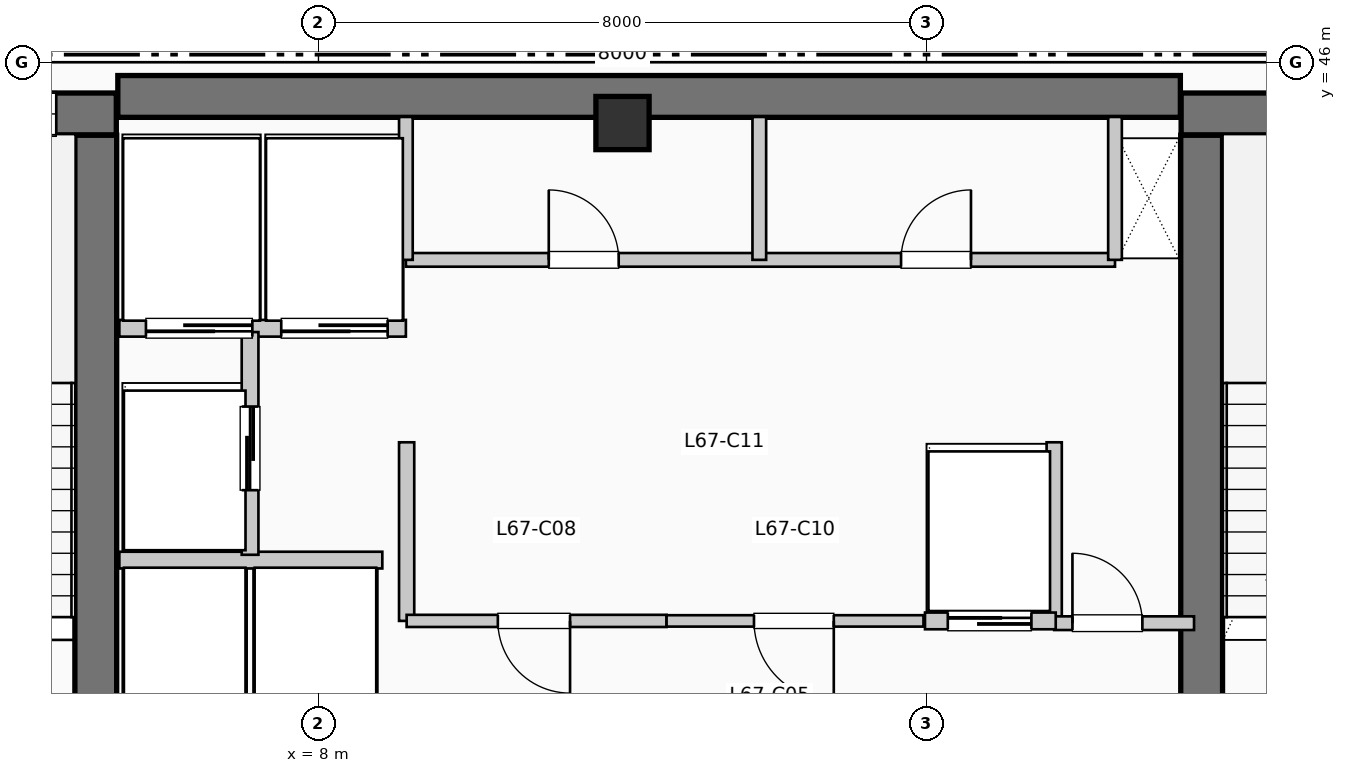
"""IFC4 building model, lengths in metres.
Left out: names, types, materials, properties, quantities, classifications, styles, units other than length and angle.
Written with IfcOpenShell. Run it as: python <this file> out.ifc"""

import sys

from ifc_helpers import new_model, si_unit, direction, frame, frame_2d, origin, origin_2d, place, context, subcontext, project, spatial, rectangle, extrude, element, fill, save


model = new_model("IFC4")
c1 = context("Model", 3, precision=1e-05, world=origin(), true_north=direction((0.0, 1.0)))
c2 = subcontext(c1, "Body", "Model", "MODEL_VIEW")
j1 = project(units=[si_unit("LENGTHUNIT", "METRE"), si_unit("PLANEANGLEUNIT", "RADIAN")], contexts=[c1])
p1 = place(None, origin())
s1 = spatial("IfcSite", under=j1, at=p1, CompositionType="ELEMENT")
p2 = place(p1, origin())
s2 = spatial("IfcBuilding", under=s1, at=p2, CompositionType="ELEMENT")
p3 = place(p2, frame((0.0, 0.0, 276.21)))
s3 = spatial("IfcBuildingStorey", under=s2, at=p3, CompositionType="ELEMENT", Elevation=276.21)
p4 = place(p3, frame((5.36, 45.55, 0.0), z_axis=(0.0, 0.0, 1.0), x_axis=(1.0, 0.0, 0.0)))
e1 = element("IfcWall", 1, at=p4, inside=s3, PredefinedType="SHEAR", context=c2, shape_type="SweptSolid", body=[
    extrude(rectangle(XDim=13.98, YDim=0.55, at=frame_2d((6.99, 0.0))), origin(), (0.0, 0.0, 1.0), 3.96),
])
p5 = place(p3, frame((5.07, 37.15, 0.0), z_axis=(0.0, 0.0, 1.0), x_axis=(0.0, 1.0, 0.0)))
e2 = element("IfcWall", 2, at=p5, inside=s3, PredefinedType="SHEAR", context=c2, shape_type="SweptSolid", body=[
    extrude(rectangle(XDim=7.89, YDim=0.55, at=frame_2d((3.945, 0.0))), origin(), (0.0, 0.0, 1.0), 3.96),
])
p6 = place(p3, frame((1.1, 45.32, 0.0), z_axis=(0.0, 0.0, 1.0), x_axis=(1.0, 0.0, 0.0)))
e3 = element("IfcWall", 3, at=p6, inside=s3, PredefinedType="SHEAR", context=c2, shape_type="SweptSolid", body=[
    extrude(rectangle(XDim=4.24, YDim=0.55, at=frame_2d((2.12, 0.0))), origin(), (0.0, 0.0, 1.0), 3.96),
])
p7 = place(p6, frame((2.05, 0.0, 1.05)))
e4 = element("IfcOpeningElement", 4, at=p7, cuts=e3, PredefinedType="OPENING", context=c2, shape_type="SweptSolid", body=[
    extrude(rectangle(XDim=1.4, YDim=1.8, at=frame_2d((0.7, 0.9))), frame((0.0, 0.285, 0.0), z_axis=(0.0, -1.0, 0.0), x_axis=(1.0, 0.0, 0.0)), (0.0, 0.0, 1.0), 0.57),
])
p8 = place(p3, frame((19.62, 37.15, 0.0), z_axis=(0.0, 0.0, 1.0), x_axis=(0.0, 1.0, 0.0)))
e5 = element("IfcWall", 5, at=p8, inside=s3, PredefinedType="SHEAR", context=c2, shape_type="SweptSolid", body=[
    extrude(rectangle(XDim=7.89, YDim=0.55, at=frame_2d((3.945, 0.0))), origin(), (0.0, 0.0, 1.0), 3.96),
])
p9 = place(p3, frame((19.35, 45.32, 0.0), z_axis=(0.0, 0.0, 1.0), x_axis=(1.0, 0.0, 0.0)))
e6 = element("IfcWall", 6, at=p9, inside=s3, PredefinedType="SHEAR", context=c2, shape_type="SweptSolid", body=[
    extrude(rectangle(XDim=3.69, YDim=0.55, at=frame_2d((1.845, 0.0))), origin(), (0.0, 0.0, 1.0), 3.96),
])
p10 = place(p9, frame((1.15, 0.0, 1.05)))
e7 = element("IfcOpeningElement", 7, at=p10, cuts=e6, PredefinedType="OPENING", context=c2, shape_type="SweptSolid", body=[
    extrude(rectangle(XDim=1.4, YDim=1.8, at=frame_2d((0.7, 0.9))), frame((0.0, 0.285, 0.0), z_axis=(0.0, -1.0, 0.0), x_axis=(1.0, 0.0, 0.0)), (0.0, 0.0, 1.0), 0.57),
])
p11 = place(p3, frame((12.0, 45.2, 0.0), z_axis=(0.0, 0.0, 1.0), x_axis=(1.0, 0.0, 0.0)))
e8 = element("IfcColumn", 8, at=p11, inside=s3, PredefinedType="COLUMN", context=c2, shape_type="SweptSolid", body=[
    extrude(rectangle(XDim=0.7, YDim=0.7, at=origin_2d()), origin(), (0.0, 0.0, 1.0), 3.96),
])
p12 = place(p3, frame((5.38, 39.45, 0.0), z_axis=(0.0, 0.0, 1.0), x_axis=(1.0, 0.0, 0.0)))
e9 = element("IfcWall", 9, at=p12, inside=s3, PredefinedType="PARTITIONING", context=c2, shape_type="SweptSolid", body=[
    extrude(rectangle(XDim=3.46, YDim=0.22, at=frame_2d((1.73, 0.0))), origin(), (0.0, 0.0, 1.0), 3.74),
])
p13 = place(p3, frame((5.38, 42.5, 0.0), z_axis=(0.0, 0.0, 1.0), x_axis=(1.0, 0.0, 0.0)))
e10 = element("IfcWall", 10, at=p13, inside=s3, PredefinedType="PARTITIONING", context=c2, shape_type="SweptSolid", body=[
    extrude(rectangle(XDim=3.77, YDim=0.22, at=frame_2d((1.885, 0.0))), origin(), (0.0, 0.0, 1.0), 3.74),
])
p14 = place(p13, frame((1.75, 0.0, 0.0), z_axis=(0.0, 0.0, 1.0), x_axis=(-1.0, 0.0, 0.0)))
e11 = element("IfcOpeningElement", 11, at=p14, cuts=e10, PredefinedType="OPENING", context=c2, shape_type="SweptSolid", body=[
    extrude(rectangle(XDim=1.4, YDim=2.2, at=frame_2d((0.7, 1.1))), frame((0.0, 0.12, 0.0), z_axis=(0.0, -1.0, 0.0), x_axis=(1.0, 0.0, 0.0)), (0.0, 0.0, 1.0), 0.24),
])
p15 = place(p13, frame((3.53, 0.0, 0.0), z_axis=(0.0, 0.0, 1.0), x_axis=(-1.0, 0.0, 0.0)))
e12 = element("IfcOpeningElement", 12, at=p15, cuts=e10, PredefinedType="OPENING", context=c2, shape_type="SweptSolid", body=[
    extrude(rectangle(XDim=1.4, YDim=2.2, at=frame_2d((0.7, 1.1))), frame((0.0, 0.12, 0.0), z_axis=(0.0, -1.0, 0.0), x_axis=(1.0, 0.0, 0.0)), (0.0, 0.0, 1.0), 0.24),
])
p16 = place(p3, frame((7.1, 39.52, 0.0), z_axis=(0.0, 0.0, 1.0), x_axis=(0.0, 1.0, 0.0)))
e13 = element("IfcWall", 13, at=p16, inside=s3, PredefinedType="PARTITIONING", context=c2, shape_type="SweptSolid", body=[
    extrude(rectangle(XDim=2.93, YDim=0.22, at=frame_2d((1.465, 0.0))), origin(), (0.0, 0.0, 1.0), 3.74),
])
p17 = place(p16, frame((0.85, 0.0, 0.0)))
e14 = element("IfcOpeningElement", 14, at=p17, cuts=e13, PredefinedType="OPENING", context=c2, shape_type="SweptSolid", body=[
    extrude(rectangle(XDim=1.1, YDim=2.2, at=frame_2d((0.55, 1.1))), frame((0.0, 0.12, 0.0), z_axis=(0.0, -1.0, 0.0), x_axis=(1.0, 0.0, 0.0)), (0.0, 0.0, 1.0), 0.24),
])
for number, where, z_axis, x_axis in (
    (15, (9.16, 38.65, 0.0), (0.0, 0.0, 1.0), (0.0, 1.0, 0.0)),
    (16, (17.68, 38.65, 0.0), (0.0, 0.0, 1.0), (0.0, 1.0, 0.0)),
):
    element("IfcWall", number, at=place(p3, frame(where, z_axis=z_axis, x_axis=x_axis)), inside=s3, PredefinedType="PARTITIONING", context=c2, shape_type="SweptSolid", body=[
        extrude(rectangle(XDim=2.35, YDim=0.2, at=frame_2d((1.175, 0.0))), origin(), (0.0, 0.0, 1.0), 3.74),
    ])
p18 = place(p3, frame((17.68, 38.62, 0.0), z_axis=(0.0, 0.0, 1.0), x_axis=(1.0, 0.0, 0.0)))
e17 = element("IfcWall", 17, at=p18, inside=s3, PredefinedType="PARTITIONING", context=c2, shape_type="SweptSolid", body=[
    extrude(rectangle(XDim=1.84, YDim=0.18, at=frame_2d((0.92, 0.0))), origin(), (0.0, 0.0, 1.0), 3.74),
])
p19 = place(p18, frame((0.24, 0.0, 0.0)))
e18 = element("IfcOpeningElement", 18, at=p19, cuts=e17, PredefinedType="OPENING", context=c2, shape_type="SweptSolid", body=[
    extrude(rectangle(XDim=0.92, YDim=2.1, at=frame_2d((0.46, 1.05))), frame((0.0, 0.1, 0.0), z_axis=(0.0, -1.0, 0.0), x_axis=(1.0, 0.0, 0.0)), (0.0, 0.0, 1.0), 0.2),
])
p20 = place(p3, frame((9.16, 38.65, 0.0), z_axis=(0.0, 0.0, 1.0), x_axis=(1.0, 0.0, 0.0)))
e19 = element("IfcWall", 19, at=p20, inside=s3, PredefinedType="PARTITIONING", context=c2, shape_type="SweptSolid", body=[
    extrude(rectangle(XDim=3.42, YDim=0.16, at=frame_2d((1.71, 0.0))), origin(), (0.0, 0.0, 1.0), 3.74),
])
p21 = place(p20, frame((2.15, 0.0, 0.0), z_axis=(0.0, 0.0, 1.0), x_axis=(-1.0, 0.0, 0.0)))
e20 = element("IfcOpeningElement", 20, at=p21, cuts=e19, PredefinedType="OPENING", context=c2, shape_type="SweptSolid", body=[
    extrude(rectangle(XDim=0.95, YDim=2.15, at=frame_2d((0.475, 1.075))), frame((0.0, 0.09, 0.0), z_axis=(0.0, -1.0, 0.0), x_axis=(1.0, 0.0, 0.0)), (0.0, 0.0, 1.0), 0.18),
])
p22 = place(p3, frame((12.58, 38.65, 0.0), z_axis=(0.0, 0.0, 1.0), x_axis=(1.0, 0.0, 0.0)))
e21 = element("IfcWall", 21, at=p22, inside=s3, PredefinedType="PARTITIONING", context=c2, shape_type="SweptSolid", body=[
    extrude(rectangle(XDim=3.38, YDim=0.15, at=frame_2d((1.69, 0.0))), origin(), (0.0, 0.0, 1.0), 3.74),
])
p23 = place(p22, frame((2.2, 0.0, 0.0), z_axis=(0.0, 0.0, 1.0), x_axis=(-1.0, 0.0, 0.0)))
e22 = element("IfcOpeningElement", 22, at=p23, cuts=e21, PredefinedType="OPENING", context=c2, shape_type="SweptSolid", body=[
    extrude(rectangle(XDim=1.05, YDim=2.15, at=frame_2d((0.525, 1.075))), frame((0.0, 0.085, 0.0), z_axis=(0.0, -1.0, 0.0), x_axis=(1.0, 0.0, 0.0)), (0.0, 0.0, 1.0), 0.17),
])
p24 = place(p3, frame((15.98, 38.65, 0.0), z_axis=(0.0, 0.0, 1.0), x_axis=(1.0, 0.0, 0.0)))
e23 = element("IfcWall", 23, at=p24, inside=s3, PredefinedType="PARTITIONING", context=c2, shape_type="SweptSolid", body=[
    extrude(rectangle(XDim=1.72, YDim=0.22, at=frame_2d((0.86, 0.0))), origin(), (0.0, 0.0, 1.0), 3.74),
])
p25 = place(p24, frame((0.3, 0.0, 0.0)))
e24 = element("IfcOpeningElement", 24, at=p25, cuts=e23, PredefinedType="OPENING", context=c2, shape_type="SweptSolid", body=[
    extrude(rectangle(XDim=1.1, YDim=2.2, at=frame_2d((0.55, 1.1))), frame((0.0, 0.12, 0.0), z_axis=(0.0, -1.0, 0.0), x_axis=(1.0, 0.0, 0.0)), (0.0, 0.0, 1.0), 0.24),
])
p26 = place(p3, frame((9.15, 43.4, 0.0), z_axis=(0.0, 0.0, 1.0), x_axis=(1.0, 0.0, 0.0)))
e25 = element("IfcWall", 25, at=p26, inside=s3, PredefinedType="PLUMBINGWALL", context=c2, shape_type="SweptSolid", body=[
    extrude(rectangle(XDim=9.33, YDim=0.18, at=frame_2d((4.665, 0.0))), origin(), (0.0, 0.0, 1.0), 3.74),
])
p27 = place(p26, frame((1.88, 0.0, 0.0)))
e26 = element("IfcOpeningElement", 26, at=p27, cuts=e25, PredefinedType="OPENING", context=c2, shape_type="SweptSolid", body=[
    extrude(rectangle(XDim=0.92, YDim=2.1, at=frame_2d((0.46, 1.05))), frame((0.0, 0.1, 0.0), z_axis=(0.0, -1.0, 0.0), x_axis=(1.0, 0.0, 0.0)), (0.0, 0.0, 1.0), 0.2),
])
p28 = place(p26, frame((6.515, 0.0, 0.0)))
e27 = element("IfcOpeningElement", 27, at=p28, cuts=e25, PredefinedType="OPENING", context=c2, shape_type="SweptSolid", body=[
    extrude(rectangle(XDim=0.92, YDim=2.1, at=frame_2d((0.46, 1.05))), frame((0.0, 0.1, 0.0), z_axis=(0.0, -1.0, 0.0), x_axis=(1.0, 0.0, 0.0)), (0.0, 0.0, 1.0), 0.2),
])
for number, where, z_axis, x_axis in (
    (28, (9.15, 43.4, 0.0), (0.0, 0.0, 1.0), (0.0, 1.0, 0.0)),
    (29, (18.48, 43.4, 0.0), (0.0, 0.0, 1.0), (0.0, 1.0, 0.0)),
    (30, (13.8, 43.4, 0.0), (0.0, 0.0, 1.0), (0.0, 1.0, 0.0)),
):
    element("IfcWall", number, at=place(p3, frame(where, z_axis=z_axis, x_axis=x_axis)), inside=s3, PredefinedType="PLUMBINGWALL", context=c2, shape_type="SweptSolid", body=[
        extrude(rectangle(XDim=1.88, YDim=0.18, at=frame_2d((0.94, 0.0))), origin(), (0.0, 0.0, 1.0), 3.74),
    ])
p29 = place(p7, origin())
e31 = element("IfcWindow", 31, at=p29, inside=s3, PartitioningType="SINGLE_PANEL", PredefinedType="WINDOW", context=c2, shape_type="SweptSolid", body=[
    extrude(rectangle(XDim=1.4, YDim=1.8, at=frame_2d((0.7, 0.9))), frame((0.0, 0.03, 0.0), z_axis=(0.0, -1.0, 0.0), x_axis=(1.0, 0.0, 0.0)), (0.0, 0.0, 1.0), 0.06),
])
fill(e4, e31)
p30 = place(p14, origin())
e32 = element("IfcDoor", 32, at=p30, inside=s3, OperationType="SLIDING_TO_LEFT", PredefinedType="DOOR", context=c2, shape_type="SweptSolid", body=[
    extrude(rectangle(XDim=1.4, YDim=2.2, at=frame_2d((0.7, 1.1))), frame((0.0, 0.025, 0.0), z_axis=(0.0, -1.0, 0.0), x_axis=(1.0, 0.0, 0.0)), (0.0, 0.0, 1.0), 0.05),
])
fill(e11, e32)
p31 = place(p15, origin())
e33 = element("IfcDoor", 33, at=p31, inside=s3, OperationType="SLIDING_TO_LEFT", PredefinedType="DOOR", context=c2, shape_type="SweptSolid", body=[
    extrude(rectangle(XDim=1.4, YDim=2.2, at=frame_2d((0.7, 1.1))), frame((0.0, 0.025, 0.0), z_axis=(0.0, -1.0, 0.0), x_axis=(1.0, 0.0, 0.0)), (0.0, 0.0, 1.0), 0.05),
])
fill(e12, e33)
p32 = place(p17, origin())
e34 = element("IfcDoor", 34, at=p32, inside=s3, OperationType="SLIDING_TO_LEFT", PredefinedType="DOOR", context=c2, shape_type="SweptSolid", body=[
    extrude(rectangle(XDim=1.1, YDim=2.2, at=frame_2d((0.55, 1.1))), frame((0.0, 0.025, 0.0), z_axis=(0.0, -1.0, 0.0), x_axis=(1.0, 0.0, 0.0)), (0.0, 0.0, 1.0), 0.05),
])
fill(e14, e34)
p33 = place(p19, origin())
e35 = element("IfcDoor", 35, at=p33, inside=s3, OperationType="SINGLE_SWING_LEFT", PredefinedType="DOOR", context=c2, shape_type="SweptSolid", body=[
    extrude(rectangle(XDim=0.92, YDim=2.1, at=frame_2d((0.46, 1.05))), frame((0.0, 0.025, 0.0), z_axis=(0.0, -1.0, 0.0), x_axis=(1.0, 0.0, 0.0)), (0.0, 0.0, 1.0), 0.05),
])
fill(e18, e35)
p34 = place(p21, origin())
e36 = element("IfcDoor", 36, at=p34, inside=s3, OperationType="SINGLE_SWING_RIGHT", PredefinedType="DOOR", context=c2, shape_type="SweptSolid", body=[
    extrude(rectangle(XDim=0.95, YDim=2.15, at=frame_2d((0.475, 1.075))), frame((0.0, 0.025, 0.0), z_axis=(0.0, -1.0, 0.0), x_axis=(1.0, 0.0, 0.0)), (0.0, 0.0, 1.0), 0.05),
])
fill(e20, e36)
p35 = place(p23, origin())
e37 = element("IfcDoor", 37, at=p35, inside=s3, OperationType="SINGLE_SWING_RIGHT", PredefinedType="DOOR", context=c2, shape_type="SweptSolid", body=[
    extrude(rectangle(XDim=1.05, YDim=2.15, at=frame_2d((0.525, 1.075))), frame((0.0, 0.025, 0.0), z_axis=(0.0, -1.0, 0.0), x_axis=(1.0, 0.0, 0.0)), (0.0, 0.0, 1.0), 0.05),
])
fill(e22, e37)
p36 = place(p25, origin())
e38 = element("IfcDoor", 38, at=p36, inside=s3, OperationType="SLIDING_TO_LEFT", PredefinedType="DOOR", context=c2, shape_type="SweptSolid", body=[
    extrude(rectangle(XDim=1.1, YDim=2.2, at=frame_2d((0.55, 1.1))), frame((0.0, 0.025, 0.0), z_axis=(0.0, -1.0, 0.0), x_axis=(1.0, 0.0, 0.0)), (0.0, 0.0, 1.0), 0.05),
])
fill(e24, e38)
p37 = place(p27, origin())
e39 = element("IfcDoor", 39, at=p37, inside=s3, OperationType="SINGLE_SWING_LEFT", PredefinedType="DOOR", context=c2, shape_type="SweptSolid", body=[
    extrude(rectangle(XDim=0.92, YDim=2.1, at=frame_2d((0.46, 1.05))), frame((0.0, 0.025, 0.0), z_axis=(0.0, -1.0, 0.0), x_axis=(1.0, 0.0, 0.0)), (0.0, 0.0, 1.0), 0.05),
])
fill(e26, e39)
p38 = place(p28, origin())
e40 = element("IfcDoor", 40, at=p38, inside=s3, OperationType="SINGLE_SWING_RIGHT", PredefinedType="DOOR", context=c2, shape_type="SweptSolid", body=[
    extrude(rectangle(XDim=0.92, YDim=2.1, at=frame_2d((0.46, 1.05))), frame((0.0, 0.025, 0.0), z_axis=(0.0, -1.0, 0.0), x_axis=(1.0, 0.0, 0.0)), (0.0, 0.0, 1.0), 0.05),
])
fill(e27, e40)
save(model, sys.argv[1])
